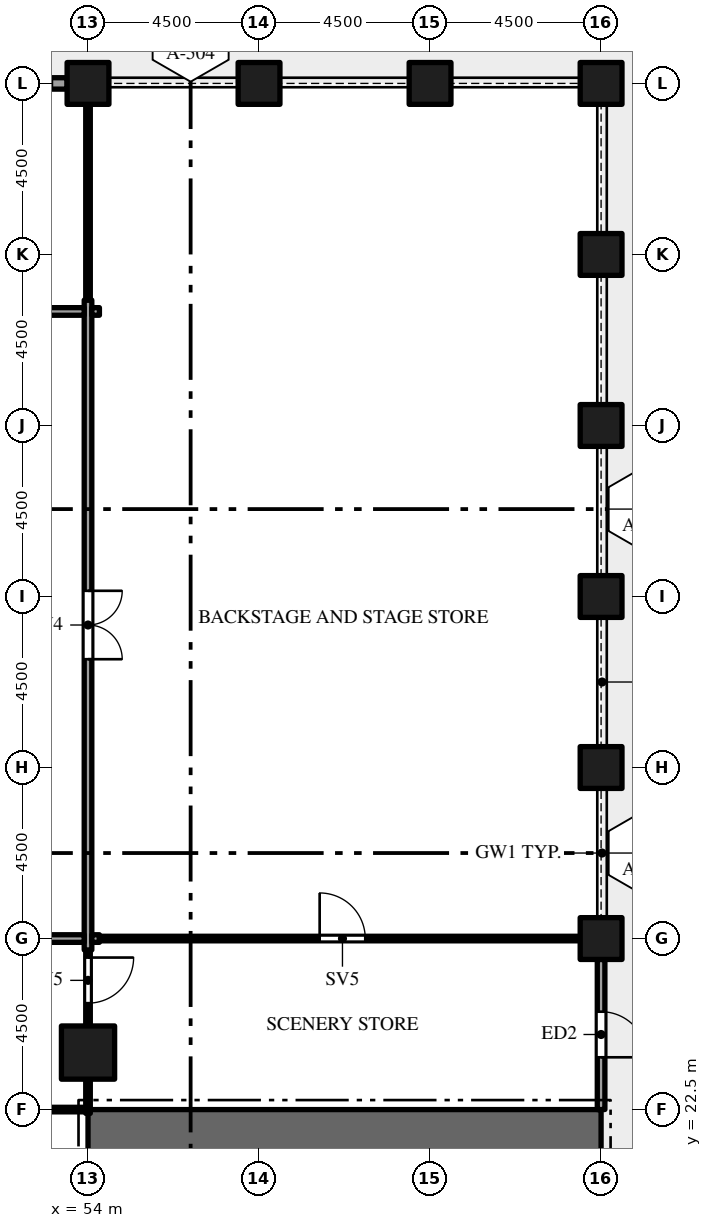
"""IFC4 building model, lengths in metres.
Left out: names, types, materials, properties, quantities, classifications, styles, units other than length and angle.
Written with IfcOpenShell. Run it as: python <this file> out.ifc"""

import sys

from ifc_helpers import new_model, si_unit, direction, frame, frame_2d, origin, origin_2d, place, context, subcontext, project, spatial, rectangle, hollow_rectangle, extrude, element, fill, save


model = new_model("IFC4")
c1 = context("Model", 3, precision=1e-05, world=origin(), true_north=direction((0.0, 1.0)))
c2 = subcontext(c1, "Body", "Model", "MODEL_VIEW")
j1 = project(units=[si_unit("LENGTHUNIT", "METRE"), si_unit("PLANEANGLEUNIT", "RADIAN")], contexts=[c1])
p1 = place(None, origin())
s1 = spatial("IfcSite", under=j1, at=p1, CompositionType="ELEMENT")
p2 = place(p1, origin())
s2 = spatial("IfcBuilding", under=s1, at=p2, CompositionType="ELEMENT")
p3 = place(p2, origin())
s3 = spatial("IfcBuildingStorey", under=s2, at=p3, CompositionType="ELEMENT", Elevation=0.0)
p4 = place(p3, frame((54.0, 21.9, -0.3), z_axis=(0.0, 0.0, 1.0), x_axis=(1.0, 0.0, 0.0)))
e1 = element("IfcWall", 1, at=p4, inside=s3, PredefinedType="SHEAR", context=c2, shape_type="SweptSolid", body=[
    extrude(rectangle(XDim=13.5, YDim=1.2, at=frame_2d((6.75, 0.0))), origin(), (0.0, 0.0, 1.0), 8.15),
])
p5 = place(p3, frame((54.0, 24.0, -0.3), z_axis=(0.0, 0.0, 1.0), x_axis=(1.0, 0.0, 0.0)))
e2 = element("IfcColumn", 2, at=p5, inside=s3, PredefinedType="COLUMN", context=c2, shape_type="SweptSolid", body=[
    extrude(hollow_rectangle(XDim=1.4, YDim=1.4, WallThickness=0.08, at=origin_2d()), origin(), (0.0, 0.0, 1.0), 8.05),
])
for number, where, z_axis, x_axis in (
    (3, (54.0, 49.5, -0.3), (0.0, 0.0, 1.0), (1.0, 0.0, 0.0)),
    (4, (58.5, 49.5, -0.3), (0.0, 0.0, 1.0), (1.0, 0.0, 0.0)),
    (5, (63.0, 49.5, -0.3), (0.0, 0.0, 1.0), (1.0, 0.0, 0.0)),
    (6, (67.5, 27.0, -0.3), (0.0, 0.0, 1.0), (1.0, 0.0, 0.0)),
    (7, (67.5, 31.5, -0.3), (0.0, 0.0, 1.0), (1.0, 0.0, 0.0)),
    (8, (67.5, 36.0, -0.3), (0.0, 0.0, 1.0), (1.0, 0.0, 0.0)),
    (9, (67.5, 40.5, -0.3), (0.0, 0.0, 1.0), (1.0, 0.0, 0.0)),
    (10, (67.5, 45.0, -0.3), (0.0, 0.0, 1.0), (1.0, 0.0, 0.0)),
    (11, (67.5, 49.5, -0.3), (0.0, 0.0, 1.0), (1.0, 0.0, 0.0)),
):
    element("IfcColumn", number, at=place(p3, frame(where, z_axis=z_axis, x_axis=x_axis)), inside=s3, PredefinedType="COLUMN", context=c2, shape_type="SweptSolid", body=[
        extrude(hollow_rectangle(XDim=1.1, YDim=1.1, WallThickness=0.06, at=origin_2d()), origin(), (0.0, 0.0, 1.0), 8.05),
    ])
p6 = place(p3, frame((67.5, 26.45, 0.0), z_axis=(0.0, 0.0, 1.0), x_axis=(0.0, -1.0, 0.0)))
e12 = element("IfcWall", 12, at=p6, inside=s3, PredefinedType="STANDARD", context=c2, shape_type="SweptSolid", body=[
    extrude(rectangle(XDim=3.949, YDim=0.2, at=frame_2d((1.975, 0.0))), origin(), (0.0, 0.0, 1.0), 7.036),
])
p7 = place(p6, frame((1.375, 0.0, 0.0)))
e13 = element("IfcOpeningElement", 13, at=p7, cuts=e12, PredefinedType="OPENING", context=c2, shape_type="SweptSolid", body=[
    extrude(rectangle(XDim=1.2, YDim=2.4, at=frame_2d((0.6, 1.2))), frame((0.0, 0.11, 0.0), z_axis=(0.0, -1.0, 0.0), x_axis=(1.0, 0.0, 0.0)), (0.0, 0.0, 1.0), 0.22),
])
p8 = place(p3, frame((53.45, 49.5, 0.0), z_axis=(0.0, 0.0, 1.0), x_axis=(-1.0, 0.0, 0.0)))
e14 = element("IfcWall", 14, at=p8, inside=s3, PredefinedType="STANDARD", context=c2, shape_type="SweptSolid", body=[
    extrude(rectangle(XDim=3.4, YDim=0.3, at=frame_2d((1.7, 0.0))), origin(), (0.0, 0.0, 1.0), 7.036),
])
p9 = place(p8, frame((0.4, 0.0, 0.9)))
e15 = element("IfcOpeningElement", 15, at=p9, cuts=e14, PredefinedType="OPENING", context=c2, shape_type="SweptSolid", body=[
    extrude(rectangle(XDim=1.0, YDim=3.5, at=frame_2d((0.5, 1.75))), frame((0.0, 0.16, 0.0), z_axis=(0.0, -1.0, 0.0), x_axis=(1.0, 0.0, 0.0)), (0.0, 0.0, 1.0), 0.32),
])
p10 = place(p8, frame((2.0, 0.0, 0.9)))
e16 = element("IfcOpeningElement", 16, at=p10, cuts=e14, PredefinedType="OPENING", context=c2, shape_type="SweptSolid", body=[
    extrude(rectangle(XDim=1.0, YDim=3.5, at=frame_2d((0.5, 1.75))), frame((0.0, 0.16, 0.0), z_axis=(0.0, -1.0, 0.0), x_axis=(1.0, 0.0, 0.0)), (0.0, 0.0, 1.0), 0.32),
])
p11 = place(p3, frame((54.0, 22.4, 0.0), z_axis=(0.0, 0.0, 1.0), x_axis=(0.0, 1.0, 0.0)))
e17 = element("IfcWall", 17, at=p11, inside=s3, PredefinedType="PARTITIONING", context=c2, shape_type="SweptSolid", body=[
    extrude(rectangle(XDim=4.3, YDim=0.12, at=frame_2d((2.15, 0.0))), origin(), (0.0, 0.0, 1.0), 6.66),
])
p12 = place(p11, frame((2.9, 0.0, 0.0)))
e18 = element("IfcOpeningElement", 18, at=p12, cuts=e17, PredefinedType="OPENING", context=c2, shape_type="SweptSolid", body=[
    extrude(rectangle(XDim=1.2, YDim=2.1, at=frame_2d((0.6, 1.05))), frame((0.0, 0.07, 0.0), z_axis=(0.0, -1.0, 0.0), x_axis=(1.0, 0.0, 0.0)), (0.0, 0.0, 1.0), 0.14),
])
p13 = place(p3, frame((54.0, 26.7, 0.0), z_axis=(0.0, 0.0, 1.0), x_axis=(0.0, 1.0, 0.0)))
e19 = element("IfcWall", 19, at=p13, inside=s3, PredefinedType="PARTITIONING", context=c2, shape_type="SweptSolid", body=[
    extrude(rectangle(XDim=17.1, YDim=0.2, at=frame_2d((8.55, 0.0))), origin(), (0.0, 0.0, 1.0), 6.66),
])
p14 = place(p13, frame((7.65, 0.0, 0.0)))
e20 = element("IfcOpeningElement", 20, at=p14, cuts=e19, PredefinedType="OPENING", context=c2, shape_type="SweptSolid", body=[
    extrude(rectangle(XDim=1.8, YDim=2.1, at=frame_2d((0.9, 1.05))), frame((0.0, 0.11, 0.0), z_axis=(0.0, -1.0, 0.0), x_axis=(1.0, 0.0, 0.0)), (0.0, 0.0, 1.0), 0.22),
])
p15 = place(p3, frame((54.0, 43.8, 0.0), z_axis=(0.0, 0.0, 1.0), x_axis=(0.0, 1.0, 0.0)))
e21 = element("IfcWall", 21, at=p15, inside=s3, PredefinedType="PARTITIONING", context=c2, shape_type="SweptSolid", body=[
    extrude(rectangle(XDim=5.55, YDim=0.12, at=frame_2d((2.775, 0.0))), origin(), (0.0, 0.0, 1.0), 6.66),
])
p16 = place(p3, frame((36.3, 22.5, 0.0), z_axis=(0.0, 0.0, 1.0), x_axis=(1.0, 0.0, 0.0)))
e22 = element("IfcWall", 22, at=p16, inside=s3, PredefinedType="PARTITIONING", context=c2, shape_type="SweptSolid", body=[
    extrude(rectangle(XDim=17.64, YDim=0.12, at=frame_2d((8.82, 0.0))), origin(), (0.0, 0.0, 1.0), 6.66),
])
p17 = place(p16, frame((3.3, 0.0, 0.0)))
e23 = element("IfcOpeningElement", 23, at=p17, cuts=e22, PredefinedType="OPENING", context=c2, shape_type="SweptSolid", body=[
    extrude(rectangle(XDim=1.8, YDim=2.1, at=frame_2d((0.9, 1.05))), frame((0.0, 0.07, 0.0), z_axis=(0.0, -1.0, 0.0), x_axis=(1.0, 0.0, 0.0)), (0.0, 0.0, 1.0), 0.14),
])
p18 = place(p3, frame((27.1, 27.0, 0.0), z_axis=(0.0, 0.0, 1.0), x_axis=(1.0, 0.0, 0.0)))
e24 = element("IfcWall", 24, at=p18, inside=s3, PredefinedType="PARTITIONING", context=c2, shape_type="SweptSolid", body=[
    extrude(rectangle(XDim=26.8, YDim=0.2, at=frame_2d((13.4, 0.0))), origin(), (0.0, 0.0, 1.0), 6.66),
])
p19 = place(p18, frame((12.5, 0.0, 0.0)))
e25 = element("IfcOpeningElement", 25, at=p19, cuts=e24, PredefinedType="OPENING", context=c2, shape_type="SweptSolid", body=[
    extrude(rectangle(XDim=1.8, YDim=2.1, at=frame_2d((0.9, 1.05))), frame((0.0, 0.11, 0.0), z_axis=(0.0, -1.0, 0.0), x_axis=(1.0, 0.0, 0.0)), (0.0, 0.0, 1.0), 0.22),
])
p20 = place(p18, frame((14.5, 0.0, 0.0)))
e26 = element("IfcOpeningElement", 26, at=p20, cuts=e24, PredefinedType="OPENING", context=c2, shape_type="SweptSolid", body=[
    extrude(rectangle(XDim=1.8, YDim=2.1, at=frame_2d((0.9, 1.05))), frame((0.0, 0.11, 0.0), z_axis=(0.0, -1.0, 0.0), x_axis=(1.0, 0.0, 0.0)), (0.0, 0.0, 1.0), 0.22),
])
p21 = place(p3, frame((54.1, 27.0, 0.0), z_axis=(0.0, 0.0, 1.0), x_axis=(1.0, 0.0, 0.0)))
e27 = element("IfcWall", 27, at=p21, inside=s3, PredefinedType="PARTITIONING", context=c2, shape_type="SweptSolid", body=[
    extrude(rectangle(XDim=0.2, YDim=0.2, at=frame_2d((0.1, 0.0))), origin(), (0.0, 0.0, 1.0), 6.66),
])
p22 = place(p3, frame((54.3, 27.0, 0.0), z_axis=(0.0, 0.0, 1.0), x_axis=(1.0, 0.0, 0.0)))
e28 = element("IfcWall", 28, at=p22, inside=s3, PredefinedType="PARTITIONING", context=c2, shape_type="SweptSolid", body=[
    extrude(rectangle(XDim=13.05, YDim=0.12, at=frame_2d((6.525, 0.0))), origin(), (0.0, 0.0, 1.0), 6.66),
])
p23 = place(p22, frame((5.795, 0.0, 0.0)))
e29 = element("IfcOpeningElement", 29, at=p23, cuts=e28, PredefinedType="OPENING", context=c2, shape_type="SweptSolid", body=[
    extrude(rectangle(XDim=1.2, YDim=2.1, at=frame_2d((0.6, 1.05))), frame((0.0, 0.07, 0.0), z_axis=(0.0, -1.0, 0.0), x_axis=(1.0, 0.0, 0.0)), (0.0, 0.0, 1.0), 0.14),
])
p24 = place(p3, frame((27.1, 43.5, 0.0), z_axis=(0.0, 0.0, 1.0), x_axis=(1.0, 0.0, 0.0)))
e30 = element("IfcWall", 30, at=p24, inside=s3, PredefinedType="PARTITIONING", context=c2, shape_type="SweptSolid", body=[
    extrude(rectangle(XDim=26.8, YDim=0.2, at=frame_2d((13.4, 0.0))), origin(), (0.0, 0.0, 1.0), 6.66),
])
p25 = place(p24, frame((12.5, 0.0, 0.0)))
e31 = element("IfcOpeningElement", 31, at=p25, cuts=e30, PredefinedType="OPENING", context=c2, shape_type="SweptSolid", body=[
    extrude(rectangle(XDim=1.8, YDim=2.1, at=frame_2d((0.9, 1.05))), frame((0.0, 0.11, 0.0), z_axis=(0.0, -1.0, 0.0), x_axis=(1.0, 0.0, 0.0)), (0.0, 0.0, 1.0), 0.22),
])
p26 = place(p3, frame((54.1, 43.5, 0.0), z_axis=(0.0, 0.0, 1.0), x_axis=(1.0, 0.0, 0.0)))
e32 = element("IfcWall", 32, at=p26, inside=s3, PredefinedType="PARTITIONING", context=c2, shape_type="SweptSolid", body=[
    extrude(rectangle(XDim=0.2, YDim=0.2, at=frame_2d((0.1, 0.0))), origin(), (0.0, 0.0, 1.0), 6.66),
])
p27 = place(p7, origin())
e33 = element("IfcDoor", 33, at=p27, inside=s3, OperationType="SINGLE_SWING_RIGHT", PredefinedType="DOOR", context=c2, shape_type="SweptSolid", body=[
    extrude(rectangle(XDim=1.2, YDim=2.4, at=frame_2d((0.6, 1.2))), frame((0.0, 0.025, 0.0), z_axis=(0.0, -1.0, 0.0), x_axis=(1.0, 0.0, 0.0)), (0.0, 0.0, 1.0), 0.05),
])
fill(e13, e33)
p28 = place(p14, origin())
e34 = element("IfcDoor", 34, at=p28, inside=s3, OperationType="DOUBLE_DOOR_SINGLE_SWING", PredefinedType="DOOR", context=c2, shape_type="SweptSolid", body=[
    extrude(rectangle(XDim=1.8, YDim=2.1, at=frame_2d((0.9, 1.05))), frame((0.0, 0.025, 0.0), z_axis=(0.0, -1.0, 0.0), x_axis=(1.0, 0.0, 0.0)), (0.0, 0.0, 1.0), 0.05),
])
fill(e20, e34)
p29 = place(p12, origin())
e35 = element("IfcDoor", 35, at=p29, inside=s3, OperationType="SINGLE_SWING_RIGHT", PredefinedType="DOOR", context=c2, shape_type="SweptSolid", body=[
    extrude(rectangle(XDim=1.2, YDim=2.1, at=frame_2d((0.6, 1.05))), frame((0.0, 0.025, 0.0), z_axis=(0.0, -1.0, 0.0), x_axis=(1.0, 0.0, 0.0)), (0.0, 0.0, 1.0), 0.05),
])
fill(e18, e35)
p30 = place(p23, origin())
e36 = element("IfcDoor", 36, at=p30, inside=s3, OperationType="SINGLE_SWING_LEFT", PredefinedType="DOOR", context=c2, shape_type="SweptSolid", body=[
    extrude(rectangle(XDim=1.2, YDim=2.1, at=frame_2d((0.6, 1.05))), frame((0.0, 0.025, 0.0), z_axis=(0.0, -1.0, 0.0), x_axis=(1.0, 0.0, 0.0)), (0.0, 0.0, 1.0), 0.05),
])
fill(e29, e36)
save(model, sys.argv[1])
